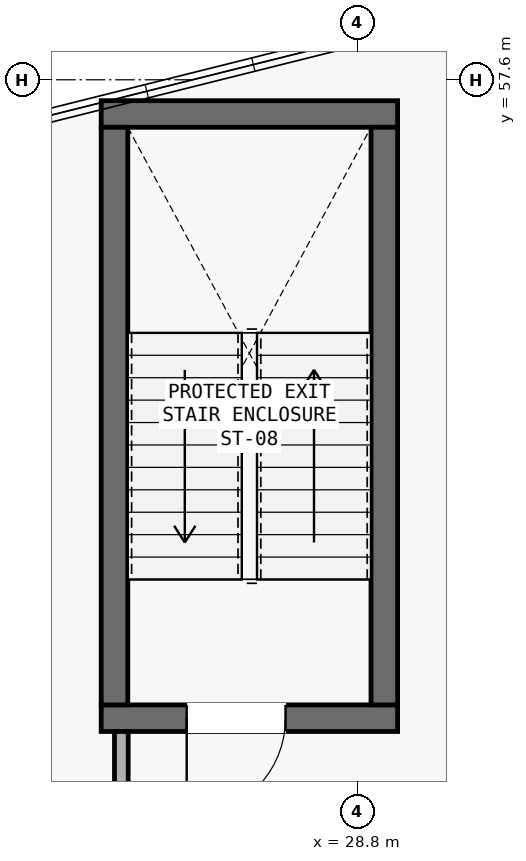
"""IFC4 building model, lengths in metres.
Left out: names, types, materials, properties, quantities, classifications, styles, units other than length and angle.
Written with IfcOpenShell. Run it as: python <this file> out.ifc"""

import sys

from ifc_helpers import new_model, si_unit, direction, frame, frame_2d, origin, place, context, subcontext, project, spatial, rectangle, extrude, element, fill, save


model = new_model("IFC4")
c1 = context("Model", 3, precision=1e-05, world=origin(), true_north=direction((0.0, 1.0)))
c2 = subcontext(c1, "Body", "Model", "MODEL_VIEW")
j1 = project(units=[si_unit("LENGTHUNIT", "METRE"), si_unit("PLANEANGLEUNIT", "RADIAN")], contexts=[c1])
p1 = place(None, origin())
s1 = spatial("IfcSite", under=j1, at=p1, CompositionType="ELEMENT")
p2 = place(p1, origin())
s2 = spatial("IfcBuilding", under=s1, at=p2, CompositionType="ELEMENT")
p3 = place(p2, frame((0.0, 0.0, 5.25)))
s3 = spatial("IfcBuildingStorey", under=s2, at=p3, CompositionType="ELEMENT", Elevation=5.25)
p4 = place(p3, frame((25.425, 49.2, 0.0), z_axis=(0.0, 0.0, 1.0), x_axis=(1.0, 0.0, 0.0)))
e1 = element("IfcWall", 1, at=p4, inside=s3, PredefinedType="SHEAR", context=c2, shape_type="SweptSolid", body=[
    extrude(rectangle(XDim=3.9, YDim=0.35, at=frame_2d((1.95, 0.0))), origin(), (0.0, 0.0, 1.0), 3.96),
])
p5 = place(p4, frame((1.125, 0.0, 0.0)))
e2 = element("IfcOpeningElement", 2, at=p5, cuts=e1, PredefinedType="OPENING", context=c2, shape_type="SweptSolid", body=[
    extrude(rectangle(XDim=1.3, YDim=2.15, at=frame_2d((0.65, 1.075))), frame((0.0, 0.185, 0.0), z_axis=(0.0, -1.0, 0.0), x_axis=(1.0, 0.0, 0.0)), (0.0, 0.0, 1.0), 0.37),
])
p6 = place(p3, frame((25.425, 57.15, 0.0), z_axis=(0.0, 0.0, 1.0), x_axis=(1.0, 0.0, 0.0)))
e3 = element("IfcWall", 3, at=p6, inside=s3, PredefinedType="SHEAR", context=c2, shape_type="SweptSolid", body=[
    extrude(rectangle(XDim=3.9, YDim=0.35, at=frame_2d((1.95, 0.0))), origin(), (0.0, 0.0, 1.0), 3.96),
])
for number, where, z_axis, x_axis in (
    (4, (25.6, 49.375, 0.0), (0.0, 0.0, 1.0), (0.0, 1.0, 0.0)),
    (5, (29.15, 49.375, 0.0), (0.0, 0.0, 1.0), (0.0, 1.0, 0.0)),
):
    element("IfcWall", number, at=place(p3, frame(where, z_axis=z_axis, x_axis=x_axis)), inside=s3, PredefinedType="SHEAR", context=c2, shape_type="SweptSolid", body=[
        extrude(rectangle(XDim=7.6, YDim=0.35, at=frame_2d((3.8, 0.0))), origin(), (0.0, 0.0, 1.0), 3.96),
    ])
p7 = place(p3, frame((25.69, 45.65, 0.0), z_axis=(0.0, 0.0, 1.0), x_axis=(0.0, 1.0, 0.0)))
e6 = element("IfcWall", 6, at=p7, inside=s3, PredefinedType="PARTITIONING", context=c2, shape_type="SweptSolid", body=[
    extrude(rectangle(XDim=3.375, YDim=0.18, at=frame_2d((1.688, 0.0))), origin(), (0.0, 0.0, 1.0), 3.96),
])
p8 = place(p5, frame((1.3, 0.0, 0.0), z_axis=(0.0, 0.0, 1.0), x_axis=(-1.0, 0.0, 0.0)))
e7 = element("IfcDoor", 7, at=p8, inside=s3, OperationType="SINGLE_SWING_LEFT", PredefinedType="DOOR", context=c2, shape_type="SweptSolid", body=[
    extrude(rectangle(XDim=1.3, YDim=2.15, at=frame_2d((0.65, 1.075))), frame((0.0, 0.025, 0.0), z_axis=(0.0, -1.0, 0.0), x_axis=(1.0, 0.0, 0.0)), (0.0, 0.0, 1.0), 0.05),
])
fill(e2, e7)
save(model, sys.argv[1])
